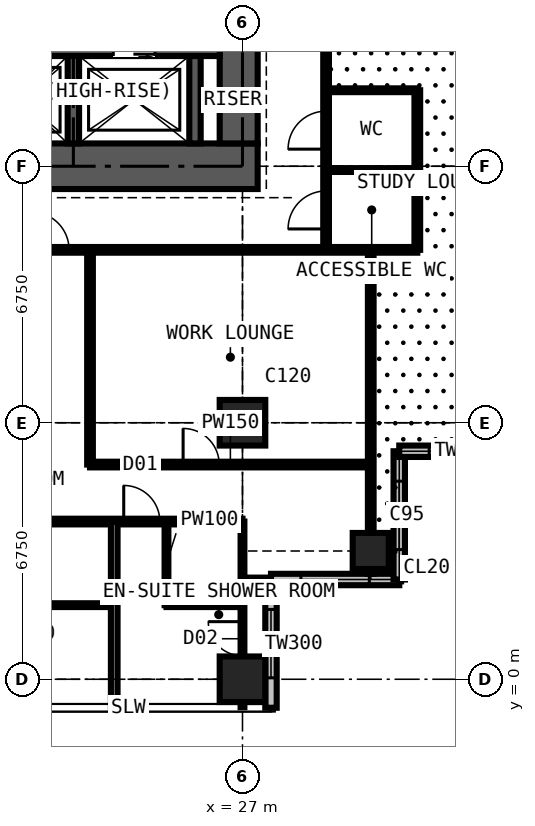
"""IFC4 building model, lengths in metres.
Left out: names, types, materials, properties, quantities, classifications, styles, units other than length and angle.
Written with IfcOpenShell. Run it as: python <this file> out.ifc"""

import sys

from ifc_helpers import new_model, si_unit, direction, frame, frame_2d, origin, origin_2d, place, context, subcontext, project, spatial, rectangle, extrude, element, fill, save


model = new_model("IFC4")
c1 = context("Model", 3, precision=1e-05, world=origin(), true_north=direction((0.0, 1.0)))
c2 = subcontext(c1, "Body", "Model", "MODEL_VIEW")
j1 = project(units=[si_unit("LENGTHUNIT", "METRE"), si_unit("PLANEANGLEUNIT", "RADIAN")], contexts=[c1])
p1 = place(None, origin())
s1 = spatial("IfcSite", under=j1, at=p1, CompositionType="ELEMENT")
p2 = place(p1, origin())
s2 = spatial("IfcBuilding", under=s1, at=p2, CompositionType="ELEMENT")
p3 = place(p2, frame((0.0, 0.0, 171.0)))
s3 = spatial("IfcBuildingStorey", under=s2, at=p3, CompositionType="ELEMENT", Elevation=171.0)
for number, where, z_axis, x_axis in (
    (1, (27.0, 0.0, 0.0), (0.0, 0.0, 1.0), (1.0, 0.0, 0.0)),
    (2, (27.0, 6.75, 0.0), (0.0, 0.0, 1.0), (1.0, 0.0, 0.0)),
):
    element("IfcColumn", number, at=place(p3, frame(where, z_axis=z_axis, x_axis=x_axis)), inside=s3, PredefinedType="COLUMN", context=c2, shape_type="SweptSolid", body=[
        extrude(rectangle(XDim=1.2, YDim=1.2, at=origin_2d()), origin(), (0.0, 0.0, 1.0), 3.6),
    ])
p4 = place(p3, frame((30.375, 3.375, 0.0), z_axis=(0.0, 0.0, 1.0), x_axis=(1.0, 0.0, 0.0)))
e3 = element("IfcColumn", 3, at=p4, inside=s3, PredefinedType="COLUMN", context=c2, shape_type="SweptSolid", body=[
    extrude(rectangle(XDim=0.95, YDim=0.95, at=origin_2d()), origin(), (0.0, 0.0, 1.0), 3.6),
])
p5 = place(p3, frame((13.1, 13.5, 0.0), z_axis=(0.0, 0.0, 1.0), x_axis=(1.0, 0.0, 0.0)))
e4 = element("IfcWall", 4, at=p5, inside=s3, PredefinedType="SHEAR", context=c2, shape_type="SweptSolid", body=[
    extrude(rectangle(XDim=14.3, YDim=1.2, at=frame_2d((7.15, 0.0))), origin(), (0.0, 0.0, 1.0), 3.6),
])
p6 = place(p3, frame((26.9, 14.1, 0.0), z_axis=(0.0, 0.0, 1.0), x_axis=(0.0, 1.0, 0.0)))
e5 = element("IfcWall", 5, at=p6, inside=s3, PredefinedType="SHEAR", context=c2, shape_type="SweptSolid", body=[
    extrude(rectangle(XDim=12.3, YDim=1.0, at=frame_2d((6.15, 0.0))), origin(), (0.0, 0.0, 1.0), 3.6),
])
p7 = place(p6, frame((3.65, 0.0, 0.0)))
e6 = element("IfcOpeningElement", 6, at=p7, cuts=e5, PredefinedType="OPENING", context=c2, shape_type="SweptSolid", body=[
    extrude(rectangle(XDim=1.2, YDim=2.2, at=frame_2d((0.6, 1.1))), frame((0.0, 0.51, 0.0), z_axis=(0.0, -1.0, 0.0), x_axis=(1.0, 0.0, 0.0)), (0.0, 0.0, 1.0), 1.02),
])
p8 = place(p3, frame((27.75, -0.75, 0.0), z_axis=(0.0, 0.0, 1.0), x_axis=(0.0, 1.0, 0.0)))
e7 = element("IfcWall", 7, at=p8, inside=s3, PredefinedType="SOLIDWALL", context=c2, shape_type="SweptSolid", body=[
    extrude(rectangle(XDim=3.375, YDim=0.3, at=frame_2d((1.688, 0.0))), origin(), (0.0, 0.0, 1.0), 3.375),
])
p9 = place(p8, frame((0.788, 0.0, 0.6)))
e8 = element("IfcOpeningElement", 8, at=p9, cuts=e7, PredefinedType="OPENING", context=c2, shape_type="SweptSolid", body=[
    extrude(rectangle(XDim=1.8, YDim=2.1, at=frame_2d((0.9, 1.05))), frame((0.0, 0.16, 0.0), z_axis=(0.0, -1.0, 0.0), x_axis=(1.0, 0.0, 0.0)), (0.0, 0.0, 1.0), 0.32),
])
p10 = place(p3, frame((27.75, 2.625, 0.0), z_axis=(0.0, 0.0, 1.0), x_axis=(1.0, 0.0, 0.0)))
e9 = element("IfcWall", 9, at=p10, inside=s3, PredefinedType="SOLIDWALL", context=c2, shape_type="SweptSolid", body=[
    extrude(rectangle(XDim=3.375, YDim=0.3, at=frame_2d((1.688, 0.0))), origin(), (0.0, 0.0, 1.0), 3.375),
])
p11 = place(p10, frame((0.788, 0.0, 0.6)))
e10 = element("IfcOpeningElement", 10, at=p11, cuts=e9, PredefinedType="OPENING", context=c2, shape_type="SweptSolid", body=[
    extrude(rectangle(XDim=1.8, YDim=2.1, at=frame_2d((0.9, 1.05))), frame((0.0, 0.16, 0.0), z_axis=(0.0, -1.0, 0.0), x_axis=(1.0, 0.0, 0.0)), (0.0, 0.0, 1.0), 0.32),
])
p12 = place(p3, frame((31.125, 2.625, 0.0), z_axis=(0.0, 0.0, 1.0), x_axis=(0.0, 1.0, 0.0)))
e11 = element("IfcWall", 11, at=p12, inside=s3, PredefinedType="SOLIDWALL", context=c2, shape_type="SweptSolid", body=[
    extrude(rectangle(XDim=3.375, YDim=0.3, at=frame_2d((1.688, 0.0))), origin(), (0.0, 0.0, 1.0), 3.375),
])
p13 = place(p12, frame((0.788, 0.0, 0.6)))
e12 = element("IfcOpeningElement", 12, at=p13, cuts=e11, PredefinedType="OPENING", context=c2, shape_type="SweptSolid", body=[
    extrude(rectangle(XDim=1.8, YDim=2.1, at=frame_2d((0.9, 1.05))), frame((0.0, 0.16, 0.0), z_axis=(0.0, -1.0, 0.0), x_axis=(1.0, 0.0, 0.0)), (0.0, 0.0, 1.0), 0.32),
])
p14 = place(p3, frame((31.125, 6.0, 0.0), z_axis=(0.0, 0.0, 1.0), x_axis=(1.0, 0.0, 0.0)))
e13 = element("IfcWall", 13, at=p14, inside=s3, PredefinedType="SOLIDWALL", context=c2, shape_type="SweptSolid", body=[
    extrude(rectangle(XDim=3.375, YDim=0.3, at=frame_2d((1.688, 0.0))), origin(), (0.0, 0.0, 1.0), 3.375),
])
p15 = place(p14, frame((0.788, 0.0, 0.6)))
e14 = element("IfcOpeningElement", 14, at=p15, cuts=e13, PredefinedType="OPENING", context=c2, shape_type="SweptSolid", body=[
    extrude(rectangle(XDim=1.8, YDim=2.1, at=frame_2d((0.9, 1.05))), frame((0.0, 0.16, 0.0), z_axis=(0.0, -1.0, 0.0), x_axis=(1.0, 0.0, 0.0)), (0.0, 0.0, 1.0), 0.32),
])
p16 = place(p3, frame((14.1, 16.5, 0.0), z_axis=(0.0, 0.0, 1.0), x_axis=(1.0, 0.0, 0.0)))
e15 = element("IfcWall", 15, at=p16, inside=s3, PredefinedType="SHEAR", context=c2, shape_type="SweptSolid", body=[
    extrude(rectangle(XDim=12.3, YDim=0.2, at=frame_2d((6.15, 0.0))), origin(), (0.0, 0.0, 1.0), 3.6),
])
p17 = place(p16, frame((0.9, 0.0, 0.0)))
e16 = element("IfcOpeningElement", 16, at=p17, cuts=e15, PredefinedType="OPENING", context=c2, shape_type="SweptSolid", body=[
    extrude(rectangle(XDim=1.1, YDim=2.2, at=frame_2d((0.55, 1.1))), frame((0.0, 0.11, 0.0), z_axis=(0.0, -1.0, 0.0), x_axis=(1.0, 0.0, 0.0)), (0.0, 0.0, 1.0), 0.22),
])
p18 = place(p16, frame((4.31, 0.0, 0.0)))
e17 = element("IfcOpeningElement", 17, at=p18, cuts=e15, PredefinedType="OPENING", context=c2, shape_type="SweptSolid", body=[
    extrude(rectangle(XDim=1.1, YDim=2.2, at=frame_2d((0.55, 1.1))), frame((0.0, 0.11, 0.0), z_axis=(0.0, -1.0, 0.0), x_axis=(1.0, 0.0, 0.0)), (0.0, 0.0, 1.0), 0.22),
])
p19 = place(p16, frame((6.45, 0.0, 0.0)))
e18 = element("IfcOpeningElement", 18, at=p19, cuts=e15, PredefinedType="OPENING", context=c2, shape_type="SweptSolid", body=[
    extrude(rectangle(XDim=1.1, YDim=2.2, at=frame_2d((0.55, 1.1))), frame((0.0, 0.11, 0.0), z_axis=(0.0, -1.0, 0.0), x_axis=(1.0, 0.0, 0.0)), (0.0, 0.0, 1.0), 0.22),
])
p20 = place(p16, frame((9.5, 0.0, 0.0)))
e19 = element("IfcOpeningElement", 19, at=p20, cuts=e15, PredefinedType="OPENING", context=c2, shape_type="SweptSolid", body=[
    extrude(rectangle(XDim=1.1, YDim=2.2, at=frame_2d((0.55, 1.1))), frame((0.0, 0.11, 0.0), z_axis=(0.0, -1.0, 0.0), x_axis=(1.0, 0.0, 0.0)), (0.0, 0.0, 1.0), 0.22),
])
for number, where, z_axis, x_axis in (
    (20, (22.55, 14.1, 0.0), (0.0, 0.0, 1.0), (0.0, 1.0, 0.0)),
    (21, (25.75, 14.1, 0.0), (0.0, 0.0, 1.0), (0.0, 1.0, 0.0)),
):
    element("IfcWall", number, at=place(p3, frame(where, z_axis=z_axis, x_axis=x_axis)), inside=s3, PredefinedType="SHEAR", context=c2, shape_type="SweptSolid", body=[
        extrude(rectangle(XDim=2.3, YDim=0.3, at=frame_2d((1.15, 0.0))), origin(), (0.0, 0.0, 1.0), 3.6),
    ])
p21 = place(p3, frame((6.75, 4.15, 0.0), z_axis=(0.0, 0.0, 1.0), x_axis=(1.0, 0.0, 0.0)))
e22 = element("IfcWall", 22, at=p21, inside=s3, PredefinedType="PARTITIONING", context=c2, shape_type="SweptSolid", body=[
    extrude(rectangle(XDim=20.25, YDim=0.15, at=frame_2d((10.125, 0.0))), origin(), (0.0, 0.0, 1.0), 3.375),
])
p22 = place(p21, frame((0.2, 0.0, 0.0)))
e23 = element("IfcOpeningElement", 23, at=p22, cuts=e22, PredefinedType="OPENING", context=c2, shape_type="SweptSolid", body=[
    extrude(rectangle(XDim=0.95, YDim=2.2, at=frame_2d((0.475, 1.1))), frame((0.0, 0.085, 0.0), z_axis=(0.0, -1.0, 0.0), x_axis=(1.0, 0.0, 0.0)), (0.0, 0.0, 1.0), 0.17),
])
p23 = place(p21, frame((3.625, 0.0, 0.0)))
e24 = element("IfcOpeningElement", 24, at=p23, cuts=e22, PredefinedType="OPENING", context=c2, shape_type="SweptSolid", body=[
    extrude(rectangle(XDim=0.95, YDim=2.2, at=frame_2d((0.475, 1.1))), frame((0.0, 0.085, 0.0), z_axis=(0.0, -1.0, 0.0), x_axis=(1.0, 0.0, 0.0)), (0.0, 0.0, 1.0), 0.17),
])
p24 = place(p21, frame((7.0, 0.0, 0.0)))
e25 = element("IfcOpeningElement", 25, at=p24, cuts=e22, PredefinedType="OPENING", context=c2, shape_type="SweptSolid", body=[
    extrude(rectangle(XDim=0.95, YDim=2.2, at=frame_2d((0.475, 1.1))), frame((0.0, 0.085, 0.0), z_axis=(0.0, -1.0, 0.0), x_axis=(1.0, 0.0, 0.0)), (0.0, 0.0, 1.0), 0.17),
])
p25 = place(p21, frame((10.375, 0.0, 0.0)))
e26 = element("IfcOpeningElement", 26, at=p25, cuts=e22, PredefinedType="OPENING", context=c2, shape_type="SweptSolid", body=[
    extrude(rectangle(XDim=0.95, YDim=2.2, at=frame_2d((0.475, 1.1))), frame((0.0, 0.085, 0.0), z_axis=(0.0, -1.0, 0.0), x_axis=(1.0, 0.0, 0.0)), (0.0, 0.0, 1.0), 0.17),
])
p26 = place(p21, frame((13.75, 0.0, 0.0)))
e27 = element("IfcOpeningElement", 27, at=p26, cuts=e22, PredefinedType="OPENING", context=c2, shape_type="SweptSolid", body=[
    extrude(rectangle(XDim=0.95, YDim=2.2, at=frame_2d((0.475, 1.1))), frame((0.0, 0.085, 0.0), z_axis=(0.0, -1.0, 0.0), x_axis=(1.0, 0.0, 0.0)), (0.0, 0.0, 1.0), 0.17),
])
p27 = place(p21, frame((17.125, 0.0, 0.0)))
e28 = element("IfcOpeningElement", 28, at=p27, cuts=e22, PredefinedType="OPENING", context=c2, shape_type="SweptSolid", body=[
    extrude(rectangle(XDim=0.95, YDim=2.2, at=frame_2d((0.475, 1.1))), frame((0.0, 0.085, 0.0), z_axis=(0.0, -1.0, 0.0), x_axis=(1.0, 0.0, 0.0)), (0.0, 0.0, 1.0), 0.17),
])
p28 = place(p3, frame((10.125, 11.3, 0.0), z_axis=(0.0, 0.0, 1.0), x_axis=(1.0, 0.0, 0.0)))
e29 = element("IfcWall", 29, at=p28, inside=s3, PredefinedType="PARTITIONING", context=c2, shape_type="SweptSolid", body=[
    extrude(rectangle(XDim=21.475, YDim=0.15, at=frame_2d((10.738, 0.0))), origin(), (0.0, 0.0, 1.0), 3.375),
])
p29 = place(p28, frame((11.312, 0.0, 0.0)))
e30 = element("IfcOpeningElement", 30, at=p29, cuts=e29, PredefinedType="OPENING", context=c2, shape_type="SweptSolid", body=[
    extrude(rectangle(XDim=1.0, YDim=2.2, at=frame_2d((0.5, 1.1))), frame((0.0, 0.085, 0.0), z_axis=(0.0, -1.0, 0.0), x_axis=(1.0, 0.0, 0.0)), (0.0, 0.0, 1.0), 0.17),
])
p30 = place(p3, frame((21.625, 1.95, 0.0), z_axis=(0.0, 0.0, 1.0), x_axis=(1.0, 0.0, 0.0)))
e31 = element("IfcWall", 31, at=p30, inside=s3, PredefinedType="PARTITIONING", context=c2, shape_type="SweptSolid", body=[
    extrude(rectangle(XDim=2.0, YDim=0.1, at=frame_2d((1.0, 0.0))), origin(), (0.0, 0.0, 1.0), 3.375),
])
p31 = place(p3, frame((22.988, 5.65, 0.0), z_axis=(0.0, 0.0, 1.0), x_axis=(1.0, 0.0, 0.0)))
e32 = element("IfcWall", 32, at=p31, inside=s3, PredefinedType="PARTITIONING", context=c2, shape_type="SweptSolid", body=[
    extrude(rectangle(XDim=7.387, YDim=0.15, at=frame_2d((3.694, 0.0))), origin(), (0.0, 0.0, 1.0), 3.375),
])
p32 = place(p31, frame((2.45, 0.0, 0.0)))
e33 = element("IfcOpeningElement", 33, at=p32, cuts=e32, PredefinedType="OPENING", context=c2, shape_type="SweptSolid", body=[
    extrude(rectangle(XDim=0.95, YDim=2.2, at=frame_2d((0.475, 1.1))), frame((0.0, 0.085, 0.0), z_axis=(0.0, -1.0, 0.0), x_axis=(1.0, 0.0, 0.0)), (0.0, 0.0, 1.0), 0.17),
])
p33 = place(p3, frame((22.988, 5.65, 0.0), z_axis=(0.0, 0.0, 1.0), x_axis=(0.0, 1.0, 0.0)))
e34 = element("IfcWall", 34, at=p33, inside=s3, PredefinedType="PARTITIONING", context=c2, shape_type="SweptSolid", body=[
    extrude(rectangle(XDim=5.65, YDim=0.15, at=frame_2d((2.825, 0.0))), origin(), (0.0, 0.0, 1.0), 3.375),
])
p34 = place(p3, frame((23.625, -0.734, 0.0), z_axis=(0.0, 0.0, 1.0), x_axis=(0.0, 1.0, 0.0)))
e35 = element("IfcWall", 35, at=p34, inside=s3, PredefinedType="PARTITIONING", context=c2, shape_type="SweptSolid", body=[
    extrude(rectangle(XDim=4.884, YDim=0.175, at=frame_2d((2.442, 0.0))), origin(), (0.0, 0.0, 1.0), 3.375),
])
p35 = place(p3, frame((25.0, 1.95, 0.0), z_axis=(0.0, 0.0, 1.0), x_axis=(0.0, 1.0, 0.0)))
e36 = element("IfcWall", 36, at=p35, inside=s3, PredefinedType="PARTITIONING", context=c2, shape_type="SweptSolid", body=[
    extrude(rectangle(XDim=2.2, YDim=0.1, at=frame_2d((1.1, 0.0))), origin(), (0.0, 0.0, 1.0), 3.375),
])
p36 = place(p3, frame((25.0, 1.95, 0.0), z_axis=(0.0, 0.0, 1.0), x_axis=(1.0, 0.0, 0.0)))
e37 = element("IfcWall", 37, at=p36, inside=s3, PredefinedType="PARTITIONING", context=c2, shape_type="SweptSolid", body=[
    extrude(rectangle(XDim=2.0, YDim=0.1, at=frame_2d((1.0, 0.0))), origin(), (0.0, 0.0, 1.0), 3.375),
])
p37 = place(p3, frame((27.0, -0.734, 0.0), z_axis=(0.0, 0.0, 1.0), x_axis=(0.0, 1.0, 0.0)))
e38 = element("IfcWall", 38, at=p37, inside=s3, PredefinedType="PARTITIONING", context=c2, shape_type="SweptSolid", body=[
    extrude(rectangle(XDim=2.684, YDim=0.1, at=frame_2d((1.342, 0.0))), origin(), (0.0, 0.0, 1.0), 2.877),
])
p38 = place(p37, frame((1.35, 0.0, 0.0)))
e39 = element("IfcOpeningElement", 39, at=p38, cuts=e38, PredefinedType="OPENING", context=c2, shape_type="SweptSolid", body=[
    extrude(rectangle(XDim=0.9, YDim=2.2, at=frame_2d((0.45, 1.1))), frame((0.0, 0.06, 0.0), z_axis=(0.0, -1.0, 0.0), x_axis=(1.0, 0.0, 0.0)), (0.0, 0.0, 1.0), 0.12),
])
p39 = place(p3, frame((27.0, 2.625, 0.0), z_axis=(0.0, 0.0, 1.0), x_axis=(0.0, 1.0, 0.0)))
e40 = element("IfcWall", 40, at=p39, inside=s3, PredefinedType="PARTITIONING", context=c2, shape_type="SweptSolid", body=[
    extrude(rectangle(XDim=1.525, YDim=0.1, at=frame_2d((0.762, 0.0))), origin(), (0.0, 0.0, 1.0), 2.877),
])
p40 = place(p3, frame((27.0, 2.625, 0.0), z_axis=(0.0, 0.0, 1.0), x_axis=(1.0, 0.0, 0.0)))
e41 = element("IfcWall", 41, at=p40, inside=s3, PredefinedType="PARTITIONING", context=c2, shape_type="SweptSolid", body=[
    extrude(rectangle(XDim=0.734, YDim=0.1, at=frame_2d((0.367, 0.0))), origin(), (0.0, 0.0, 1.0), 3.375),
])
p41 = place(p3, frame((29.2, 11.3, 0.0), z_axis=(0.0, 0.0, 1.0), x_axis=(0.0, 1.0, 0.0)))
e42 = element("IfcWall", 42, at=p41, inside=s3, PredefinedType="PARTITIONING", context=c2, shape_type="SweptSolid", body=[
    extrude(rectangle(XDim=19.809, YDim=0.15, at=frame_2d((9.904, 0.0))), origin(), (0.0, 0.0, 1.0), 3.375),
])
p42 = place(p41, frame((0.55, 0.0, 0.0)))
e43 = element("IfcOpeningElement", 43, at=p42, cuts=e42, PredefinedType="OPENING", context=c2, shape_type="SweptSolid", body=[
    extrude(rectangle(XDim=1.0, YDim=2.2, at=frame_2d((0.5, 1.1))), frame((0.0, 0.085, 0.0), z_axis=(0.0, -1.0, 0.0), x_axis=(1.0, 0.0, 0.0)), (0.0, 0.0, 1.0), 0.17),
])
p43 = place(p41, frame((2.65, 0.0, 0.0)))
e44 = element("IfcOpeningElement", 44, at=p43, cuts=e42, PredefinedType="OPENING", context=c2, shape_type="SweptSolid", body=[
    extrude(rectangle(XDim=1.0, YDim=2.2, at=frame_2d((0.5, 1.1))), frame((0.0, 0.085, 0.0), z_axis=(0.0, -1.0, 0.0), x_axis=(1.0, 0.0, 0.0)), (0.0, 0.0, 1.0), 0.17),
])
p44 = place(p41, frame((7.45, 0.0, 0.0)))
e45 = element("IfcOpeningElement", 45, at=p44, cuts=e42, PredefinedType="OPENING", context=c2, shape_type="SweptSolid", body=[
    extrude(rectangle(XDim=1.5, YDim=2.2, at=frame_2d((0.75, 1.1))), frame((0.0, 0.085, 0.0), z_axis=(0.0, -1.0, 0.0), x_axis=(1.0, 0.0, 0.0)), (0.0, 0.0, 1.0), 0.17),
])
p45 = place(p3, frame((29.2, 13.4, 0.0), z_axis=(0.0, 0.0, 1.0), x_axis=(1.0, 0.0, 0.0)))
e46 = element("IfcWall", 46, at=p45, inside=s3, PredefinedType="PARTITIONING", context=c2, shape_type="SweptSolid", body=[
    extrude(rectangle(XDim=2.4, YDim=0.1, at=frame_2d((1.2, 0.0))), origin(), (0.0, 0.0, 1.0), 2.806),
])
p46 = place(p3, frame((29.2, 15.5, 0.0), z_axis=(0.0, 0.0, 1.0), x_axis=(1.0, 0.0, 0.0)))
e47 = element("IfcWall", 47, at=p46, inside=s3, PredefinedType="PARTITIONING", context=c2, shape_type="SweptSolid", body=[
    extrude(rectangle(XDim=2.4, YDim=0.1, at=frame_2d((1.2, 0.0))), origin(), (0.0, 0.0, 1.0), 3.375),
])
p47 = place(p3, frame((30.375, 2.775, 0.0), z_axis=(0.0, 0.0, 1.0), x_axis=(0.0, 1.0, 0.0)))
e48 = element("IfcWall", 48, at=p47, inside=s3, PredefinedType="PARTITIONING", context=c2, shape_type="SweptSolid", body=[
    extrude(rectangle(XDim=8.525, YDim=0.15, at=frame_2d((4.263, 0.0))), origin(), (0.0, 0.0, 1.0), 2.877),
])
p48 = place(p3, frame((31.6, 11.3, 0.0), z_axis=(0.0, 0.0, 1.0), x_axis=(0.0, 1.0, 0.0)))
e49 = element("IfcWall", 49, at=p48, inside=s3, PredefinedType="PARTITIONING", context=c2, shape_type="SweptSolid", body=[
    extrude(rectangle(XDim=4.2, YDim=0.15, at=frame_2d((2.1, 0.0))), origin(), (0.0, 0.0, 1.0), 3.375),
])
p49 = place(p9, origin())
e50 = element("IfcWindow", 50, at=p49, inside=s3, PartitioningType="SINGLE_PANEL", PredefinedType="WINDOW", context=c2, shape_type="SweptSolid", body=[
    extrude(rectangle(XDim=1.8, YDim=2.1, at=frame_2d((0.9, 1.05))), frame((0.0, 0.03, 0.0), z_axis=(0.0, -1.0, 0.0), x_axis=(1.0, 0.0, 0.0)), (0.0, 0.0, 1.0), 0.06),
])
fill(e8, e50)
p50 = place(p11, origin())
e51 = element("IfcWindow", 51, at=p50, inside=s3, PartitioningType="SINGLE_PANEL", PredefinedType="WINDOW", context=c2, shape_type="SweptSolid", body=[
    extrude(rectangle(XDim=1.8, YDim=2.1, at=frame_2d((0.9, 1.05))), frame((0.0, 0.03, 0.0), z_axis=(0.0, -1.0, 0.0), x_axis=(1.0, 0.0, 0.0)), (0.0, 0.0, 1.0), 0.06),
])
fill(e10, e51)
p51 = place(p13, origin())
e52 = element("IfcWindow", 52, at=p51, inside=s3, PartitioningType="SINGLE_PANEL", PredefinedType="WINDOW", context=c2, shape_type="SweptSolid", body=[
    extrude(rectangle(XDim=1.8, YDim=2.1, at=frame_2d((0.9, 1.05))), frame((0.0, 0.03, 0.0), z_axis=(0.0, -1.0, 0.0), x_axis=(1.0, 0.0, 0.0)), (0.0, 0.0, 1.0), 0.06),
])
fill(e12, e52)
p52 = place(p15, origin())
e53 = element("IfcWindow", 53, at=p52, inside=s3, PartitioningType="SINGLE_PANEL", PredefinedType="WINDOW", context=c2, shape_type="SweptSolid", body=[
    extrude(rectangle(XDim=1.8, YDim=2.1, at=frame_2d((0.9, 1.05))), frame((0.0, 0.03, 0.0), z_axis=(0.0, -1.0, 0.0), x_axis=(1.0, 0.0, 0.0)), (0.0, 0.0, 1.0), 0.06),
])
fill(e14, e53)
p53 = place(p20, origin())
e54 = element("IfcDoor", 54, at=p53, inside=s3, OperationType="DOUBLE_DOOR_SLIDING", PredefinedType="DOOR", context=c2, shape_type="SweptSolid", body=[
    extrude(rectangle(XDim=1.1, YDim=2.2, at=frame_2d((0.55, 1.1))), frame((0.0, 0.025, 0.0), z_axis=(0.0, -1.0, 0.0), x_axis=(1.0, 0.0, 0.0)), (0.0, 0.0, 1.0), 0.05),
])
fill(e19, e54)
p54 = place(p27, origin())
e55 = element("IfcDoor", 55, at=p54, inside=s3, OperationType="SINGLE_SWING_LEFT", PredefinedType="DOOR", context=c2, shape_type="SweptSolid", body=[
    extrude(rectangle(XDim=0.95, YDim=2.2, at=frame_2d((0.475, 1.1))), frame((0.0, 0.025, 0.0), z_axis=(0.0, -1.0, 0.0), x_axis=(1.0, 0.0, 0.0)), (0.0, 0.0, 1.0), 0.05),
])
fill(e28, e55)
p55 = place(p38, origin())
e56 = element("IfcDoor", 56, at=p55, inside=s3, OperationType="SINGLE_SWING_RIGHT", PredefinedType="DOOR", context=c2, shape_type="SweptSolid", body=[
    extrude(rectangle(XDim=0.9, YDim=2.2, at=frame_2d((0.45, 1.1))), frame((0.0, 0.025, 0.0), z_axis=(0.0, -1.0, 0.0), x_axis=(1.0, 0.0, 0.0)), (0.0, 0.0, 1.0), 0.05),
])
fill(e39, e56)
p56 = place(p29, origin())
e57 = element("IfcDoor", 57, at=p56, inside=s3, OperationType="SINGLE_SWING_LEFT", PredefinedType="DOOR", context=c2, shape_type="SweptSolid", body=[
    extrude(rectangle(XDim=1.0, YDim=2.2, at=frame_2d((0.5, 1.1))), frame((0.0, 0.025, 0.0), z_axis=(0.0, -1.0, 0.0), x_axis=(1.0, 0.0, 0.0)), (0.0, 0.0, 1.0), 0.05),
])
fill(e30, e57)
p57 = place(p32, origin())
e58 = element("IfcDoor", 58, at=p57, inside=s3, OperationType="SINGLE_SWING_LEFT", PredefinedType="DOOR", context=c2, shape_type="SweptSolid", body=[
    extrude(rectangle(XDim=0.95, YDim=2.2, at=frame_2d((0.475, 1.1))), frame((0.0, 0.025, 0.0), z_axis=(0.0, -1.0, 0.0), x_axis=(1.0, 0.0, 0.0)), (0.0, 0.0, 1.0), 0.05),
])
fill(e33, e58)
p58 = place(p42, origin())
e59 = element("IfcDoor", 59, at=p58, inside=s3, OperationType="SINGLE_SWING_LEFT", PredefinedType="DOOR", context=c2, shape_type="SweptSolid", body=[
    extrude(rectangle(XDim=1.0, YDim=2.2, at=frame_2d((0.5, 1.1))), frame((0.0, 0.025, 0.0), z_axis=(0.0, -1.0, 0.0), x_axis=(1.0, 0.0, 0.0)), (0.0, 0.0, 1.0), 0.05),
])
fill(e43, e59)
p59 = place(p43, origin())
e60 = element("IfcDoor", 60, at=p59, inside=s3, OperationType="SINGLE_SWING_LEFT", PredefinedType="DOOR", context=c2, shape_type="SweptSolid", body=[
    extrude(rectangle(XDim=1.0, YDim=2.2, at=frame_2d((0.5, 1.1))), frame((0.0, 0.025, 0.0), z_axis=(0.0, -1.0, 0.0), x_axis=(1.0, 0.0, 0.0)), (0.0, 0.0, 1.0), 0.05),
])
fill(e44, e60)
save(model, sys.argv[1])
